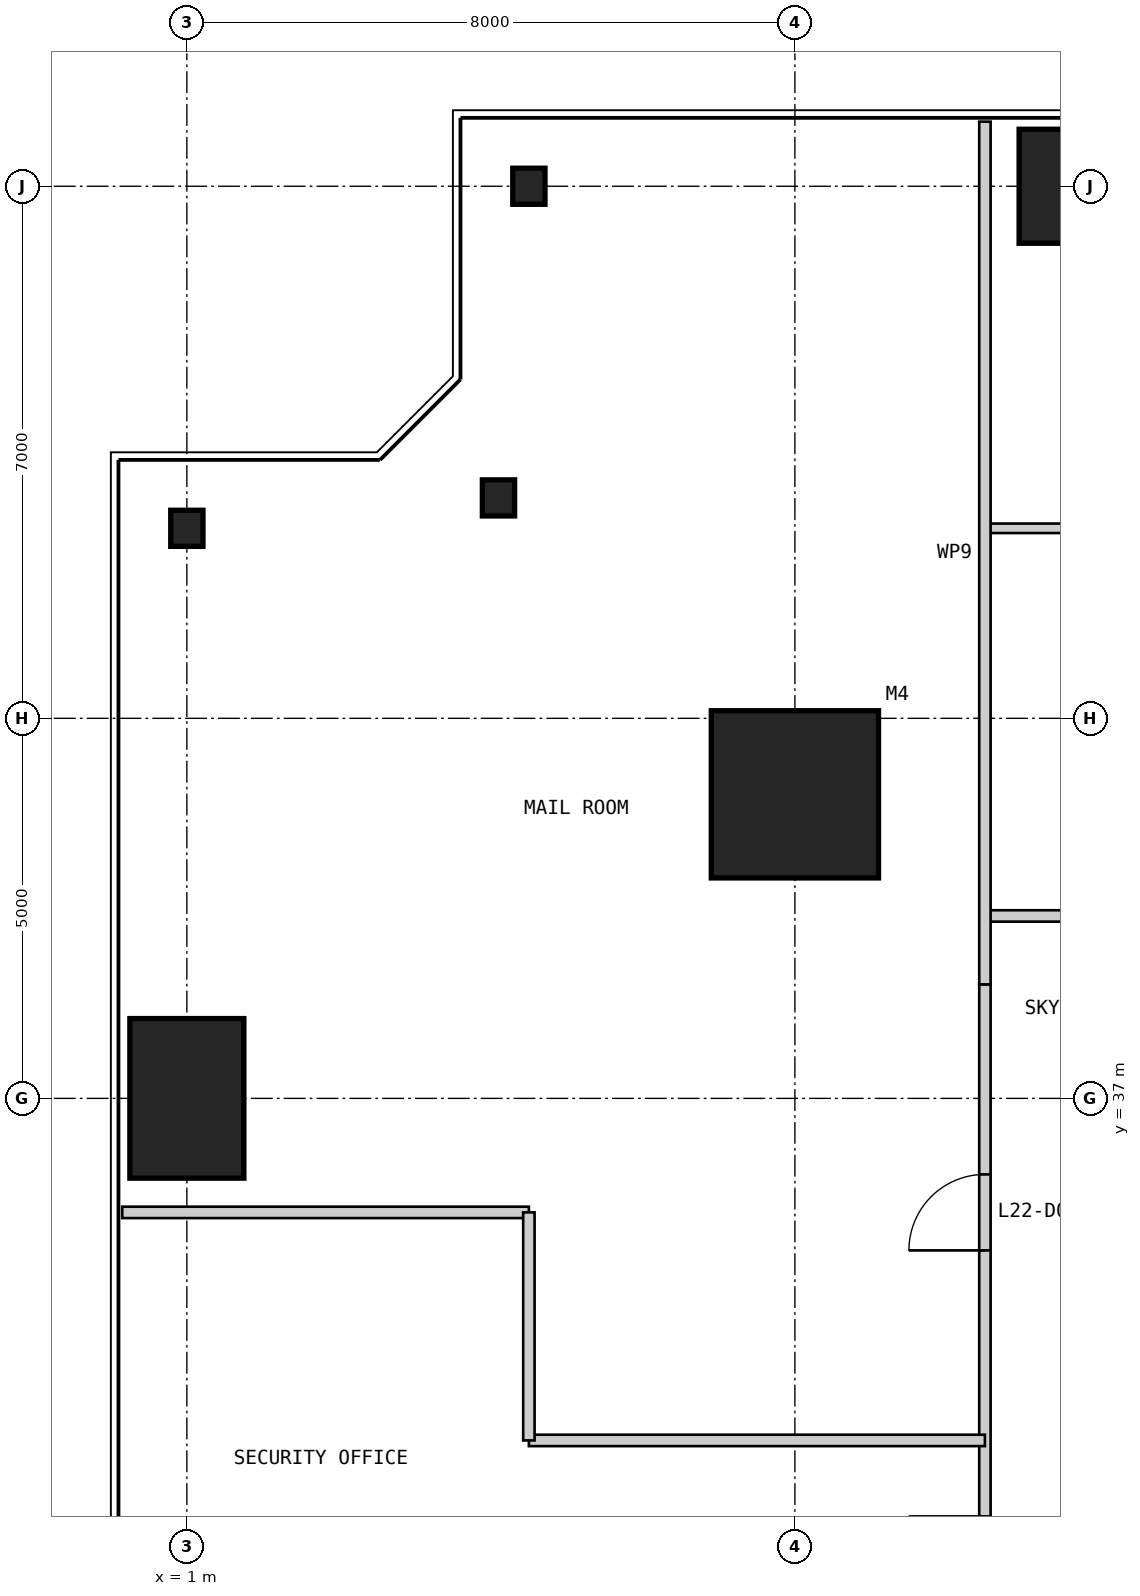
"""IFC4 building model, lengths in metres.
Left out: names, types, materials, properties, quantities, classifications, styles, units other than length and angle.
Written with IfcOpenShell. Run it as: python <this file> out.ifc"""

import sys

from ifc_helpers import new_model, si_unit, direction, frame, frame_2d, origin, origin_2d, place, context, subcontext, project, spatial, rectangle, i_section, extrude, element, fill, save


model = new_model("IFC4")
c1 = context("Model", 3, precision=1e-05, world=origin(), true_north=direction((0.0, 1.0)))
c2 = subcontext(c1, "Body", "Model", "MODEL_VIEW")
j1 = project(units=[si_unit("LENGTHUNIT", "METRE"), si_unit("PLANEANGLEUNIT", "RADIAN")], contexts=[c1])
p1 = place(None, origin())
s1 = spatial("IfcSite", under=j1, at=p1, CompositionType="ELEMENT")
p2 = place(p1, origin())
s2 = spatial("IfcBuilding", under=s1, at=p2, CompositionType="ELEMENT")
p3 = place(p2, frame((0.0, 0.0, 97.0)))
s3 = spatial("IfcBuildingStorey", under=s2, at=p3, CompositionType="ELEMENT", Elevation=97.0)
p4 = place(p3, frame((9.0, 41.0, 0.0), z_axis=(0.0, 0.0, 1.0), x_axis=(1.0, 0.0, 0.0)))
e1 = element("IfcColumn", 1, at=p4, inside=s3, PredefinedType="COLUMN", context=c2, shape_type="SweptSolid", body=[
    extrude(rectangle(XDim=2.2, YDim=2.2, at=origin_2d()), origin(), (0.0, 0.0, 1.0), 5.4),
])
p5 = place(p3, frame((13.0, 49.0, 0.0), z_axis=(0.0, 0.0, 1.0), x_axis=(1.0, 0.0, 0.0)))
e2 = element("IfcColumn", 2, at=p5, inside=s3, PredefinedType="COLUMN", context=c2, shape_type="SweptSolid", body=[
    extrude(rectangle(XDim=2.1, YDim=1.5, at=origin_2d()), origin(), (0.0, 0.0, 1.0), 5.4),
])
for number, where, z_axis, x_axis in (
    (3, (5.5, 49.0, 0.0), (0.0, 0.0, 1.0), (1.0, 0.0, 0.0)),
    (4, (5.1, 44.9, 0.0), (0.0, 0.0, 1.0), (1.0, 0.0, 0.0)),
    (5, (1.0, 44.5, 0.0), (0.0, 0.0, 1.0), (1.0, 0.0, 0.0)),
):
    element("IfcColumn", number, at=place(p3, frame(where, z_axis=z_axis, x_axis=x_axis)), inside=s3, PredefinedType="COLUMN", context=c2, shape_type="SweptSolid", body=[
        extrude(i_section(OverallWidth=0.424, OverallDepth=0.475, WebThickness=0.048, FlangeThickness=0.077, at=origin_2d()), origin(), (0.0, 0.0, 1.0), 5.4),
    ])
p6 = place(p3, frame((1.0, 37.0, 0.0), z_axis=(0.0, 0.0, 1.0), x_axis=(1.0, 0.0, 0.0)))
e6 = element("IfcColumn", 6, at=p6, inside=s3, PredefinedType="COLUMN", context=c2, shape_type="SweptSolid", body=[
    extrude(rectangle(XDim=1.5, YDim=2.1, at=origin_2d()), origin(), (0.0, 0.0, 1.0), 5.4),
])
p7 = place(p3, frame((38.5, 39.4, 0.0), z_axis=(0.0, 0.0, 1.0), x_axis=(-1.0, 0.0, 0.0)))
e7 = element("IfcWall", 7, at=p7, inside=s3, PredefinedType="PARTITIONING", context=c2, shape_type="SweptSolid", body=[
    extrude(rectangle(XDim=27.0, YDim=0.15, at=frame_2d((13.5, 0.0))), origin(), (0.0, 0.0, 1.0), 5.25),
])
p8 = place(p7, frame((11.5, 0.0, 0.0)))
e8 = element("IfcOpeningElement", 8, at=p8, cuts=e7, PredefinedType="OPENING", context=c2, shape_type="SweptSolid", body=[
    extrude(rectangle(XDim=1.0, YDim=2.2, at=frame_2d((0.5, 1.1))), frame((0.0, 0.085, 0.0), z_axis=(0.0, -1.0, 0.0), x_axis=(1.0, 0.0, 0.0)), (0.0, 0.0, 1.0), 0.17),
])
p9 = place(p3, frame((14.5, 44.5, 0.0), z_axis=(0.0, 0.0, 1.0), x_axis=(-1.0, 0.0, 0.0)))
e9 = element("IfcWall", 9, at=p9, inside=s3, PredefinedType="PARTITIONING", context=c2, shape_type="SweptSolid", body=[
    extrude(rectangle(XDim=3.0, YDim=0.125, at=frame_2d((1.5, 0.0))), origin(), (0.0, 0.0, 1.0), 5.25),
])
p10 = place(p3, frame((11.5, 38.5, 0.0), z_axis=(0.0, 0.0, 1.0), x_axis=(0.0, -1.0, 0.0)))
e10 = element("IfcWall", 10, at=p10, inside=s3, PredefinedType="PARTITIONING", context=c2, shape_type="SweptSolid", body=[
    extrude(rectangle(XDim=27.0, YDim=0.15, at=frame_2d((13.5, 0.0))), origin(), (0.0, 0.0, 1.0), 5.25),
])
p11 = place(p10, frame((2.5, 0.0, 0.0)))
e11 = element("IfcOpeningElement", 11, at=p11, cuts=e10, PredefinedType="OPENING", context=c2, shape_type="SweptSolid", body=[
    extrude(rectangle(XDim=1.0, YDim=2.2, at=frame_2d((0.5, 1.1))), frame((0.0, 0.085, 0.0), z_axis=(0.0, -1.0, 0.0), x_axis=(1.0, 0.0, 0.0)), (0.0, 0.0, 1.0), 0.17),
])
p12 = place(p10, frame((7.0, 0.0, 0.0)))
e12 = element("IfcOpeningElement", 12, at=p12, cuts=e10, PredefinedType="OPENING", context=c2, shape_type="SweptSolid", body=[
    extrude(rectangle(XDim=1.0, YDim=2.2, at=frame_2d((0.5, 1.1))), frame((0.0, 0.085, 0.0), z_axis=(0.0, -1.0, 0.0), x_axis=(1.0, 0.0, 0.0)), (0.0, 0.0, 1.0), 0.17),
])
p13 = place(p10, frame((14.5, 0.0, 0.0)))
e13 = element("IfcOpeningElement", 13, at=p13, cuts=e10, PredefinedType="OPENING", context=c2, shape_type="SweptSolid", body=[
    extrude(rectangle(XDim=1.0, YDim=2.2, at=frame_2d((0.5, 1.1))), frame((0.0, 0.085, 0.0), z_axis=(0.0, -1.0, 0.0), x_axis=(1.0, 0.0, 0.0)), (0.0, 0.0, 1.0), 0.17),
])
p14 = place(p3, frame((11.5, 49.85, 0.0), z_axis=(0.0, 0.0, 1.0), x_axis=(0.0, -1.0, 0.0)))
e14 = element("IfcWall", 14, at=p14, inside=s3, PredefinedType="PARTITIONING", context=c2, shape_type="SweptSolid", body=[
    extrude(rectangle(XDim=11.35, YDim=0.15, at=frame_2d((5.675, 0.0))), origin(), (0.0, 0.0, 1.0), 5.25),
])
p15 = place(p3, frame((0.15, 35.5, 0.0), z_axis=(0.0, 0.0, 1.0), x_axis=(1.0, 0.0, 0.0)))
e15 = element("IfcWall", 15, at=p15, inside=s3, PredefinedType="PARTITIONING", context=c2, shape_type="SweptSolid", body=[
    extrude(rectangle(XDim=5.35, YDim=0.15, at=frame_2d((2.675, 0.0))), origin(), (0.0, 0.0, 1.0), 5.25),
])
p16 = place(p3, frame((5.5, 32.5, 0.0), z_axis=(0.0, 0.0, 1.0), x_axis=(1.0, 0.0, 0.0)))
e16 = element("IfcWall", 16, at=p16, inside=s3, PredefinedType="PARTITIONING", context=c2, shape_type="SweptSolid", body=[
    extrude(rectangle(XDim=6.0, YDim=0.15, at=frame_2d((3.0, 0.0))), origin(), (0.0, 0.0, 1.0), 5.25),
])
p17 = place(p3, frame((5.5, 35.5, 0.0), z_axis=(0.0, 0.0, 1.0), x_axis=(0.0, -1.0, 0.0)))
e17 = element("IfcWall", 17, at=p17, inside=s3, PredefinedType="PARTITIONING", context=c2, shape_type="SweptSolid", body=[
    extrude(rectangle(XDim=3.0, YDim=0.15, at=frame_2d((1.5, 0.0))), origin(), (0.0, 0.0, 1.0), 5.25),
])
p18 = place(p11, frame((1.0, 0.0, 0.0), z_axis=(0.0, 0.0, 1.0), x_axis=(-1.0, 0.0, 0.0)))
e18 = element("IfcDoor", 18, at=p18, inside=s3, OperationType="SINGLE_SWING_LEFT", PredefinedType="DOOR", context=c2, shape_type="SweptSolid", body=[
    extrude(rectangle(XDim=1.0, YDim=2.2, at=frame_2d((0.5, 1.1))), frame((0.0, 0.025, 0.0), z_axis=(0.0, -1.0, 0.0), x_axis=(1.0, 0.0, 0.0)), (0.0, 0.0, 1.0), 0.05),
])
fill(e11, e18)
save(model, sys.argv[1])
